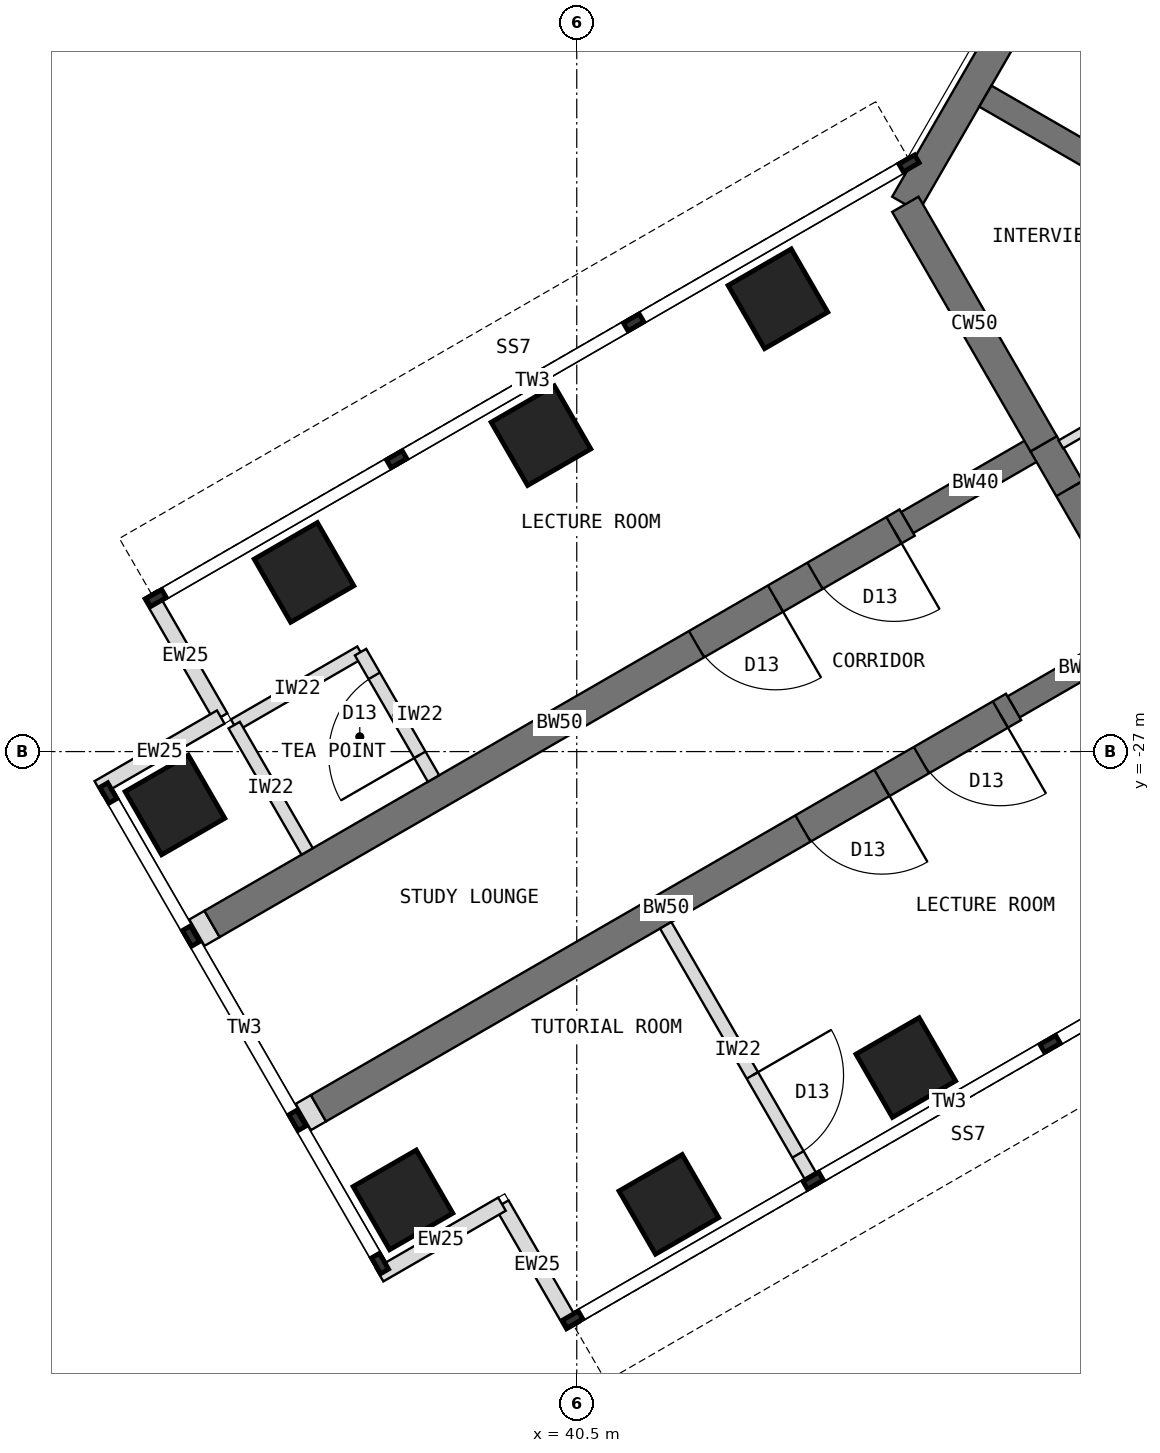
"""IFC4 building model, lengths in metres.
Left out: names, types, materials, properties, quantities, classifications, styles, units other than length and angle.
Written with IfcOpenShell. Run it as: python <this file> out.ifc"""

import sys

from ifc_helpers import new_model, si_unit, direction, frame, frame_2d, origin, origin_2d, place, context, subcontext, project, spatial, rectangle, extrude, element, fill, save


model = new_model("IFC4")
c1 = context("Model", 3, precision=1e-05, world=origin(), true_north=direction((0.0, 1.0)))
c2 = subcontext(c1, "Body", "Model", "MODEL_VIEW")
j1 = project(units=[si_unit("LENGTHUNIT", "METRE"), si_unit("PLANEANGLEUNIT", "RADIAN")], contexts=[c1])
p1 = place(None, origin())
s1 = spatial("IfcSite", under=j1, at=p1, CompositionType="ELEMENT")
p2 = place(p1, origin())
s2 = spatial("IfcBuilding", under=s1, at=p2, CompositionType="ELEMENT")
p3 = place(p2, frame((0.0, 0.0, 174.5)))
s3 = spatial("IfcBuildingStorey", under=s2, at=p3, CompositionType="ELEMENT", Elevation=174.5)
p4 = place(p3, frame((52.202, -7.092, 0.0), z_axis=(0.0, 0.0, 1.0), x_axis=(-0.500005998175, -0.866021940709, 0.0)))
e1 = element("IfcWall", 1, at=p4, inside=s3, PredefinedType="SHEAR", context=c2, shape_type="SweptSolid", body=[
    extrude(rectangle(XDim=12.596, YDim=0.5, at=frame_2d((6.298, 0.0))), origin(), (0.0, 0.0, 1.0), 4.0),
])
p5 = place(p3, frame((45.904, -18.0, 0.0), z_axis=(0.0, 0.0, 1.0), x_axis=(0.500024481964, -0.866011268655, 0.0)))
e2 = element("IfcWall", 2, at=p5, inside=s3, PredefinedType="SHEAR", context=c2, shape_type="SweptSolid", body=[
    extrude(rectangle(XDim=4.548, YDim=0.5, at=frame_2d((2.274, 0.0))), origin(), (0.0, 0.0, 1.0), 4.0),
])
p6 = place(p3, frame((48.178, -21.939, 0.0), z_axis=(0.0, 0.0, 1.0), x_axis=(0.500010275428, -0.866019471182, 0.0)))
e3 = element("IfcWall", 3, at=p6, inside=s3, PredefinedType="SHEAR", context=c2, shape_type="SweptSolid", body=[
    extrude(rectangle(XDim=3.5, YDim=0.5, at=frame_2d((1.75, 0.0))), origin(), (0.0, 0.0, 1.0), 4.0),
])
p7 = place(p6, frame((0.85, 0.0, 0.0)))
e4 = element("IfcOpeningElement", 4, at=p7, cuts=e3, PredefinedType="OPENING", context=c2, shape_type="SweptSolid", body=[
    extrude(rectangle(XDim=1.8, YDim=2.1, at=frame_2d((0.9, 1.05))), frame((0.0, 0.26, 0.0), z_axis=(0.0, -1.0, 0.0), x_axis=(1.0, 0.0, 0.0)), (0.0, 0.0, 1.0), 0.52),
])
p8 = place(p3, frame((49.928, -24.97, 0.0), z_axis=(0.0, 0.0, 1.0), x_axis=(-0.866031863473, -0.499988811324, 0.0)))
e5 = element("IfcWall", 5, at=p8, inside=s3, PredefinedType="SHEAR", context=c2, shape_type="SweptSolid", body=[
    extrude(rectangle(XDim=2.592, YDim=0.4, at=frame_2d((1.296, 0.0))), origin(), (0.0, 0.0, 1.0), 4.0),
])
p9 = place(p3, frame((47.684, -26.266, 0.0), z_axis=(0.0, 0.0, 1.0), x_axis=(-0.866027579429, -0.499996231654, 0.0)))
e6 = element("IfcWall", 6, at=p9, inside=s3, PredefinedType="SHEAR", context=c2, shape_type="SweptSolid", body=[
    extrude(rectangle(XDim=13.2, YDim=0.5, at=frame_2d((6.6, 0.0))), origin(), (0.0, 0.0, 1.0), 4.0),
])
p10 = place(p9, frame((0.25, 0.0, 0.0)))
e7 = element("IfcOpeningElement", 7, at=p10, cuts=e6, PredefinedType="OPENING", context=c2, shape_type="SweptSolid", body=[
    extrude(rectangle(XDim=1.5, YDim=2.1, at=frame_2d((0.75, 1.05))), frame((0.0, 0.26, 0.0), z_axis=(0.0, -1.0, 0.0), x_axis=(1.0, 0.0, 0.0)), (0.0, 0.0, 1.0), 0.52),
])
p11 = place(p9, frame((2.5, 0.0, 0.0)))
e8 = element("IfcOpeningElement", 8, at=p11, cuts=e6, PredefinedType="OPENING", context=c2, shape_type="SweptSolid", body=[
    extrude(rectangle(XDim=1.5, YDim=2.1, at=frame_2d((0.75, 1.05))), frame((0.0, 0.26, 0.0), z_axis=(0.0, -1.0, 0.0), x_axis=(1.0, 0.0, 0.0)), (0.0, 0.0, 1.0), 0.52),
])
p12 = place(p3, frame((48.178, -21.939, 0.0), z_axis=(0.0, 0.0, 1.0), x_axis=(-0.866072649678, -0.499918158782, 0.0)))
e9 = element("IfcWall", 9, at=p12, inside=s3, PredefinedType="SHEAR", context=c2, shape_type="SweptSolid", body=[
    extrude(rectangle(XDim=2.592, YDim=0.4, at=frame_2d((1.296, 0.0))), origin(), (0.0, 0.0, 1.0), 4.0),
])
p13 = place(p3, frame((45.934, -23.234, 0.0), z_axis=(0.0, 0.0, 1.0), x_axis=(-0.866019570528, -0.500010103361, 0.0)))
e10 = element("IfcWall", 10, at=p13, inside=s3, PredefinedType="SHEAR", context=c2, shape_type="SweptSolid", body=[
    extrude(rectangle(XDim=13.2, YDim=0.5, at=frame_2d((6.6, 0.0))), origin(), (0.0, 0.0, 1.0), 4.0),
])
p14 = place(p13, frame((0.25, 0.0, 0.0)))
e11 = element("IfcOpeningElement", 11, at=p14, cuts=e10, PredefinedType="OPENING", context=c2, shape_type="SweptSolid", body=[
    extrude(rectangle(XDim=1.5, YDim=2.1, at=frame_2d((0.75, 1.05))), frame((0.0, 0.26, 0.0), z_axis=(0.0, -1.0, 0.0), x_axis=(1.0, 0.0, 0.0)), (0.0, 0.0, 1.0), 0.52),
])
p15 = place(p13, frame((2.5, 0.0, 0.0)))
e12 = element("IfcOpeningElement", 12, at=p15, cuts=e10, PredefinedType="OPENING", context=c2, shape_type="SweptSolid", body=[
    extrude(rectangle(XDim=1.5, YDim=2.1, at=frame_2d((0.75, 1.05))), frame((0.0, 0.26, 0.0), z_axis=(0.0, -1.0, 0.0), x_axis=(1.0, 0.0, 0.0)), (0.0, 0.0, 1.0), 0.52),
])
for number, where, z_axis, x_axis in (
    (13, (43.809, -19.554, 0.0), (0.0, 0.0, 1.0), (0.866, 0.5, 0.0)),
    (14, (45.912, -32.196, 0.0), (0.0, 0.0, 1.0), (0.866, 0.5, 0.0)),
    (15, (39.912, -21.804, 0.0), (0.0, 0.0, 1.0), (0.866, 0.5, 0.0)),
    (16, (42.014, -34.446, 0.0), (0.0, 0.0, 1.0), (0.866, 0.5, 0.0)),
    (17, (36.014, -24.054, 0.0), (0.0, 0.0, 1.0), (0.866, 0.5, 0.0)),
    (18, (37.642, -34.373, 0.0), (0.0, 0.0, 1.0), (0.866, 0.5, 0.0)),
    (19, (33.892, -27.877, 0.0), (0.0, 0.0, 1.0), (0.866, 0.5, 0.0)),
):
    element("IfcColumn", number, at=place(p3, frame(where, z_axis=z_axis, x_axis=x_axis)), inside=s3, PredefinedType="COLUMN", context=c2, shape_type="SweptSolid", body=[
        extrude(rectangle(XDim=1.2, YDim=1.2, at=origin_2d()), origin(), (0.0, 0.0, 1.0), 4.0),
    ])
for number, where, z_axis, x_axis in (
    (20, (40.433, -36.456, 0.0), (0.0, 0.0, 1.0), (-0.5, 0.866, 0.0)),
    (21, (39.27, -34.443, 0.0), (0.0, 0.0, 1.0), (-0.866, -0.5, 0.0)),
    (22, (33.483, -24.419, 0.0), (0.0, 0.0, 1.0), (0.5, -0.866, 0.0)),
    (23, (34.645, -26.432, 0.0), (0.0, 0.0, 1.0), (-0.866, -0.5, 0.0)),
):
    element("IfcWall", number, at=place(p3, frame(where, z_axis=z_axis, x_axis=x_axis)), inside=s3, PredefinedType="STANDARD", context=c2, shape_type="SweptSolid", body=[
        extrude(rectangle(XDim=2.325, YDim=0.25, at=frame_2d((1.163, 0.0))), origin(), (0.0, 0.0, 1.0), 3.8),
    ])
for number, where, z_axis, x_axis in (
    (24, (36.252, -32.865, 0.0), (0.0, 0.0, 1.0), (-0.866, -0.5, 0.0)),
    (25, (34.502, -29.834, 0.0), (0.0, 0.0, 1.0), (-0.866, -0.5, 0.0)),
):
    element("IfcWall", number, at=place(p3, frame(where, z_axis=z_axis, x_axis=x_axis)), inside=s3, PredefinedType="PARTITIONING", context=c2, shape_type="SweptSolid", body=[
        extrude(rectangle(XDim=0.288, YDim=0.5, at=frame_2d((0.144, 0.0))), origin(), (0.0, 0.0, 1.0), 3.8),
    ])
p16 = place(p3, frame((52.38, -19.201, 0.0), z_axis=(0.0, 0.0, 1.0), x_axis=(-0.866012946976, 0.500021575205, 0.0)))
e26 = element("IfcWall", 26, at=p16, inside=s3, PredefinedType="SHEAR", context=c2, shape_type="SweptSolid", body=[
    extrude(rectangle(XDim=5.958, YDim=0.4, at=frame_2d((2.979, 0.0))), origin(), (0.0, 0.0, 1.0), 4.0),
])
p17 = place(p3, frame((41.963, -29.857, 0.0), z_axis=(0.0, 0.0, 1.0), x_axis=(0.499986429846, -0.866033238375, 0.0)))
e27 = element("IfcWall", 27, at=p17, inside=s3, PredefinedType="PARTITIONING", context=c2, shape_type="SweptSolid", body=[
    extrude(rectangle(XDim=4.75, YDim=0.215, at=frame_2d((2.375, 0.0))), origin(), (0.0, 0.0, 1.0), 3.8),
])
p18 = place(p17, frame((2.85, 0.0, 0.0)))
e28 = element("IfcOpeningElement", 28, at=p18, cuts=e27, PredefinedType="OPENING", context=c2, shape_type="SweptSolid", body=[
    extrude(rectangle(XDim=1.5, YDim=2.1, at=frame_2d((0.75, 1.05))), frame((0.0, 0.117, 0.0), z_axis=(0.0, -1.0, 0.0), x_axis=(1.0, 0.0, 0.0)), (0.0, 0.0, 1.0), 0.235),
])
p19 = place(p3, frame((36.944, -25.365, 0.0), z_axis=(0.0, 0.0, 1.0), x_axis=(-0.866024647952, -0.500001309137, 0.0)))
e29 = element("IfcWall", 29, at=p19, inside=s3, PredefinedType="PARTITIONING", context=c2, shape_type="SweptSolid", body=[
    extrude(rectangle(XDim=2.4, YDim=0.215, at=frame_2d((1.2, 0.0))), origin(), (0.0, 0.0, 1.0), 3.8),
])
p20 = place(p3, frame((38.144, -27.443, 0.0), z_axis=(0.0, 0.0, 1.0), x_axis=(-0.500001309137, 0.866024647952, 0.0)))
e30 = element("IfcWall", 30, at=p20, inside=s3, PredefinedType="PARTITIONING", context=c2, shape_type="SweptSolid", body=[
    extrude(rectangle(XDim=2.4, YDim=0.215, at=frame_2d((1.2, 0.0))), origin(), (0.0, 0.0, 1.0), 3.8),
])
p21 = place(p20, frame((0.45, 0.0, 0.0)))
e31 = element("IfcOpeningElement", 31, at=p21, cuts=e30, PredefinedType="OPENING", context=c2, shape_type="SweptSolid", body=[
    extrude(rectangle(XDim=1.5, YDim=2.1, at=frame_2d((0.75, 1.05))), frame((0.0, 0.117, 0.0), z_axis=(0.0, -1.0, 0.0), x_axis=(1.0, 0.0, 0.0)), (0.0, 0.0, 1.0), 0.235),
])
p22 = place(p3, frame((36.066, -28.643, 0.0), z_axis=(0.0, 0.0, 1.0), x_axis=(-0.499957262057, 0.866050077142, 0.0)))
e32 = element("IfcWall", 32, at=p22, inside=s3, PredefinedType="PARTITIONING", context=c2, shape_type="SweptSolid", body=[
    extrude(rectangle(XDim=2.4, YDim=0.215, at=frame_2d((1.2, 0.0))), origin(), (0.0, 0.0, 1.0), 3.8),
])
p23 = place(p3, frame((48.461, -21.948, 0.0), z_axis=(0.0, 0.0, 1.0), x_axis=(0.866024503882, 0.500001558674, 0.0)))
e33 = element("IfcWall", 33, at=p23, inside=s3, PredefinedType="PARTITIONING", context=c2, shape_type="SweptSolid", body=[
    extrude(rectangle(XDim=4.568, YDim=0.15, at=frame_2d((2.284, 0.0))), origin(), (0.0, 0.0, 1.0), 3.8),
])
p24 = place(p23, frame((1.774, 0.0, 0.0)))
e34 = element("IfcOpeningElement", 34, at=p24, cuts=e33, PredefinedType="OPENING", context=c2, shape_type="SweptSolid", body=[
    extrude(rectangle(XDim=1.0, YDim=2.1, at=frame_2d((0.5, 1.05))), frame((0.0, 0.085, 0.0), z_axis=(0.0, -1.0, 0.0), x_axis=(1.0, 0.0, 0.0)), (0.0, 0.0, 1.0), 0.17),
])
p25 = place(p7, origin())
e35 = element("IfcDoor", 35, at=p25, inside=s3, OperationType="DOUBLE_DOOR_DOUBLE_SWING", PredefinedType="DOOR", context=c2, shape_type="SweptSolid", body=[
    extrude(rectangle(XDim=1.8, YDim=2.1, at=frame_2d((0.9, 1.05))), frame((0.0, 0.025, 0.0), z_axis=(0.0, -1.0, 0.0), x_axis=(1.0, 0.0, 0.0)), (0.0, 0.0, 1.0), 0.05),
])
fill(e4, e35)
p26 = place(p18, origin())
e36 = element("IfcDoor", 36, at=p26, inside=s3, OperationType="DOUBLE_DOOR_SINGLE_SWING", PredefinedType="DOOR", context=c2, shape_type="SweptSolid", body=[
    extrude(rectangle(XDim=1.5, YDim=2.1, at=frame_2d((0.75, 1.05))), frame((0.0, 0.025, 0.0), z_axis=(0.0, -1.0, 0.0), x_axis=(1.0, 0.0, 0.0)), (0.0, 0.0, 1.0), 0.05),
])
fill(e28, e36)
p27 = place(p21, origin())
e37 = element("IfcDoor", 37, at=p27, inside=s3, OperationType="DOUBLE_DOOR_SINGLE_SWING", PredefinedType="DOOR", context=c2, shape_type="SweptSolid", body=[
    extrude(rectangle(XDim=1.5, YDim=2.1, at=frame_2d((0.75, 1.05))), frame((0.0, 0.025, 0.0), z_axis=(0.0, -1.0, 0.0), x_axis=(1.0, 0.0, 0.0)), (0.0, 0.0, 1.0), 0.05),
])
fill(e31, e37)
p28 = place(p10, origin())
e38 = element("IfcDoor", 38, at=p28, inside=s3, OperationType="DOUBLE_DOOR_SINGLE_SWING", PredefinedType="DOOR", context=c2, shape_type="SweptSolid", body=[
    extrude(rectangle(XDim=1.5, YDim=2.1, at=frame_2d((0.75, 1.05))), frame((0.0, 0.025, 0.0), z_axis=(0.0, -1.0, 0.0), x_axis=(1.0, 0.0, 0.0)), (0.0, 0.0, 1.0), 0.05),
])
fill(e7, e38)
p29 = place(p11, origin())
e39 = element("IfcDoor", 39, at=p29, inside=s3, OperationType="DOUBLE_DOOR_SINGLE_SWING", PredefinedType="DOOR", context=c2, shape_type="SweptSolid", body=[
    extrude(rectangle(XDim=1.5, YDim=2.1, at=frame_2d((0.75, 1.05))), frame((0.0, 0.025, 0.0), z_axis=(0.0, -1.0, 0.0), x_axis=(1.0, 0.0, 0.0)), (0.0, 0.0, 1.0), 0.05),
])
fill(e8, e39)
p30 = place(p14, origin())
e40 = element("IfcDoor", 40, at=p30, inside=s3, OperationType="DOUBLE_DOOR_SINGLE_SWING", PredefinedType="DOOR", context=c2, shape_type="SweptSolid", body=[
    extrude(rectangle(XDim=1.5, YDim=2.1, at=frame_2d((0.75, 1.05))), frame((0.0, 0.025, 0.0), z_axis=(0.0, -1.0, 0.0), x_axis=(1.0, 0.0, 0.0)), (0.0, 0.0, 1.0), 0.05),
])
fill(e11, e40)
p31 = place(p15, origin())
e41 = element("IfcDoor", 41, at=p31, inside=s3, OperationType="DOUBLE_DOOR_SINGLE_SWING", PredefinedType="DOOR", context=c2, shape_type="SweptSolid", body=[
    extrude(rectangle(XDim=1.5, YDim=2.1, at=frame_2d((0.75, 1.05))), frame((0.0, 0.025, 0.0), z_axis=(0.0, -1.0, 0.0), x_axis=(1.0, 0.0, 0.0)), (0.0, 0.0, 1.0), 0.05),
])
fill(e12, e41)
save(model, sys.argv[1])
